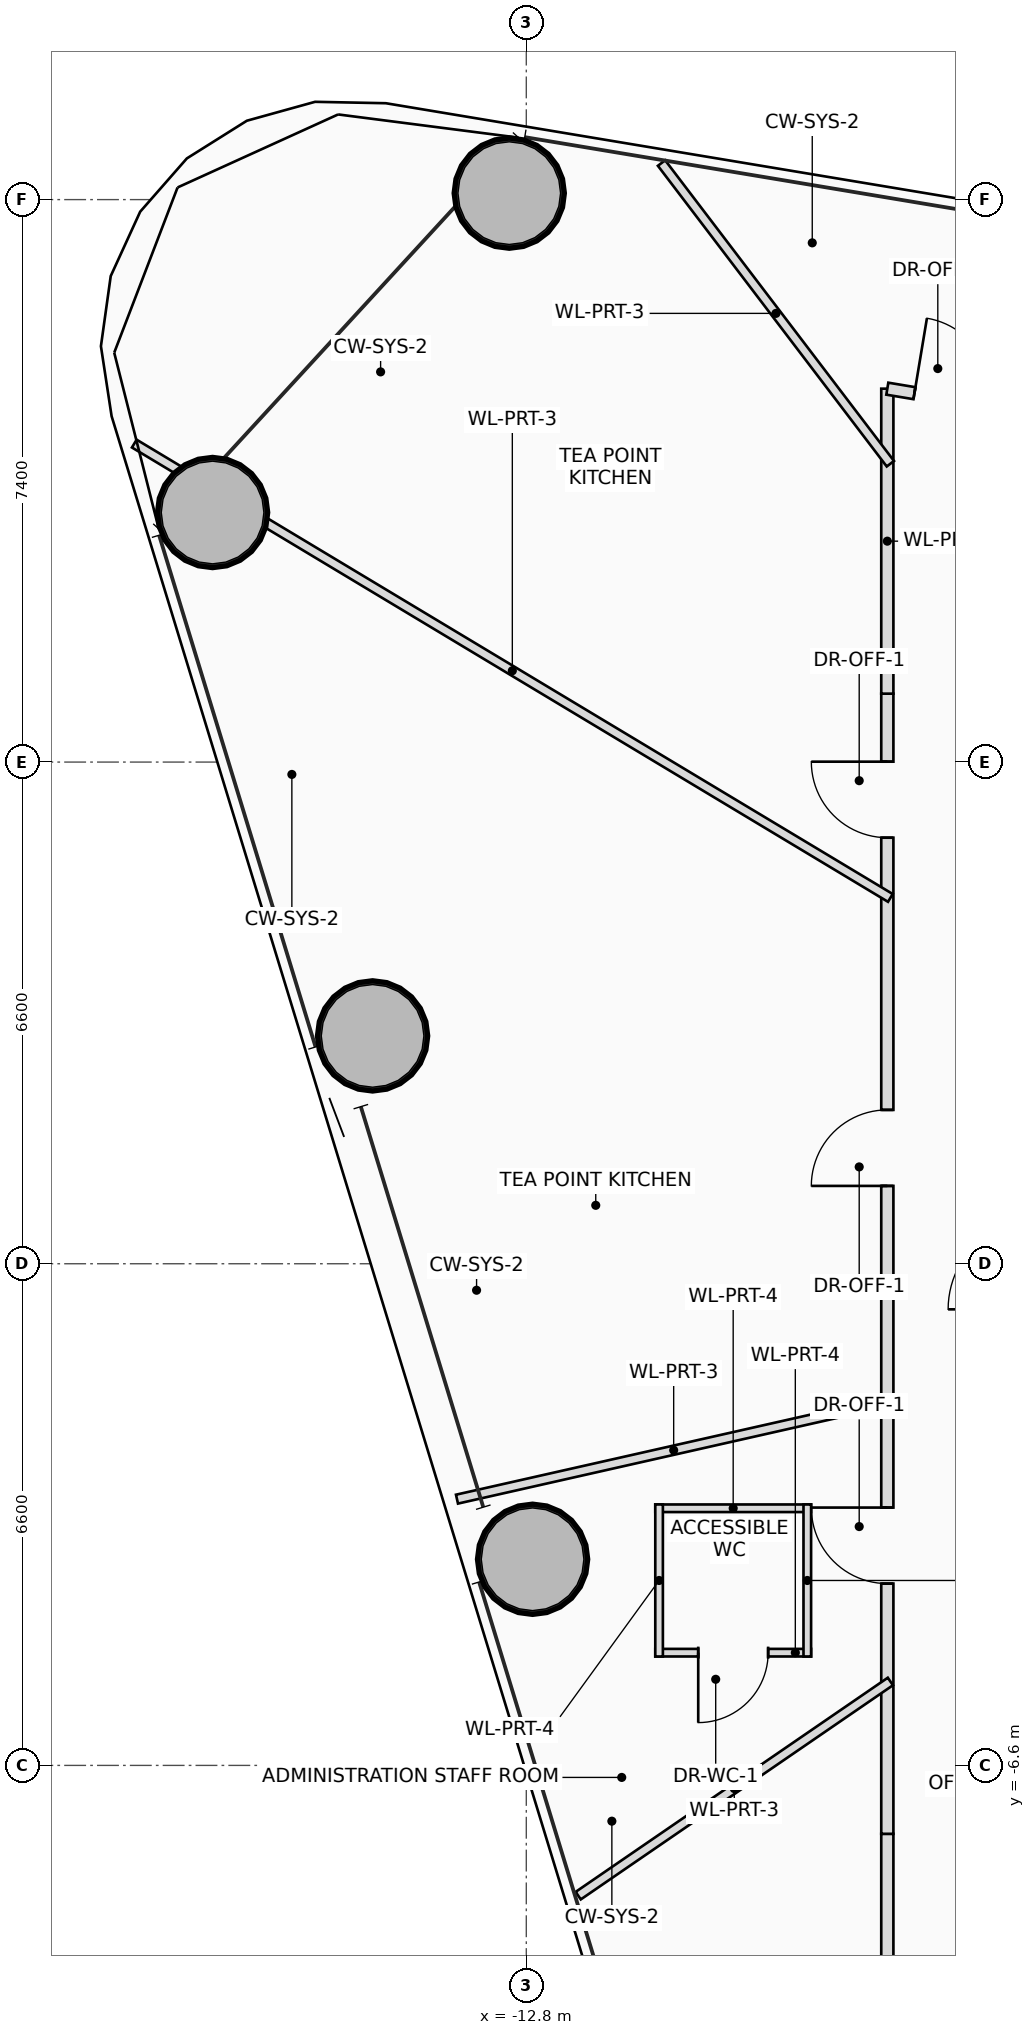
"""IFC4 building model, lengths in metres.
Left out: names, types, materials, properties, quantities, classifications, styles, units other than length and angle.
Written with IfcOpenShell. Run it as: python <this file> out.ifc"""

import sys

from ifc_helpers import new_model, si_unit, direction, frame, frame_2d, origin, origin_2d, place, context, subcontext, project, spatial, rectangle, hollow_circle, extrude, source, transform, mapped, element, fill, save


model = new_model("IFC4")
c1 = context("Model", 3, precision=1e-05, world=origin(), true_north=direction((0.0, 1.0)))
c2 = subcontext(c1, "Body", "Model", "MODEL_VIEW")
j1 = project(units=[si_unit("LENGTHUNIT", "METRE"), si_unit("PLANEANGLEUNIT", "RADIAN")], contexts=[c1])
p1 = place(None, origin())
s1 = spatial("IfcSite", under=j1, at=p1, CompositionType="ELEMENT")
p2 = place(p1, origin())
s2 = spatial("IfcBuilding", under=s1, at=p2, CompositionType="ELEMENT")
p3 = place(p2, frame((0.0, 0.0, 93.65)))
s3 = spatial("IfcBuildingStorey", under=s2, at=p3, CompositionType="ELEMENT", Elevation=93.65)
m1 = source(origin(), c2, "Body", "SweptSolid", [
    extrude(hollow_circle(Radius=0.725, WallThickness=0.05, at=origin_2d()), origin(), (0.0, 0.0, 1.0), 3.75),
])
for number, where, z_axis, x_axis in (
    (1, (-13.024, 14.085, 0.0), (0.0, 0.0, 1.0), (1.0, 0.0, 0.0)),
    (2, (-16.927, 9.883, 0.0), (0.0, 0.0, 1.0), (1.0, 0.0, 0.0)),
    (3, (-14.823, 2.998, 0.0), (0.0, 0.0, 1.0), (1.0, 0.0, 0.0)),
    (4, (-12.717, -3.888, 0.0), (0.0, 0.0, 1.0), (1.0, 0.0, 0.0)),
):
    element("IfcColumn", number, at=place(p3, frame(where, z_axis=z_axis, x_axis=x_axis)), inside=s3, PredefinedType="COLUMN", context=c2, shape_type="MappedRepresentation", body=[
        mapped(m1, transform((0.0, 0.0, 0.0), scale=1.0)),
    ])
p4 = place(p3, frame((-11.103, -3.217, 0.0), z_axis=(0.0, 0.0, 1.0), x_axis=(1.0, 0.0, 0.0)))
e5 = element("IfcWall", 5, at=p4, inside=s3, PredefinedType="PARTITIONING", context=c2, shape_type="SweptSolid", body=[
    extrude(rectangle(XDim=2.05, YDim=0.1, at=frame_2d((1.025, 0.0))), origin(), (0.0, 0.0, 1.0), 3.05),
])
p5 = place(p3, frame((-9.053, -5.117, 0.0), z_axis=(0.0, 0.0, 1.0), x_axis=(-1.0, 0.0, 0.0)))
e6 = element("IfcWall", 6, at=p5, inside=s3, PredefinedType="PARTITIONING", context=c2, shape_type="SweptSolid", body=[
    extrude(rectangle(XDim=2.05, YDim=0.1, at=frame_2d((1.025, 0.0))), origin(), (0.0, 0.0, 1.0), 3.05),
])
p6 = place(p5, frame((0.565, 0.0, 0.0)))
e7 = element("IfcOpeningElement", 7, at=p6, cuts=e6, PredefinedType="OPENING", context=c2, shape_type="SweptSolid", body=[
    extrude(rectangle(XDim=0.92, YDim=2.1, at=frame_2d((0.46, 1.05))), frame((0.0, 0.06, 0.0), z_axis=(0.0, -1.0, 0.0), x_axis=(1.0, 0.0, 0.0)), (0.0, 0.0, 1.0), 0.12),
])
for number, where, z_axis, x_axis in (
    (8, (-9.103, -3.167, 0.0), (0.0, 0.0, 1.0), (0.0, -1.0, 0.0)),
    (9, (-11.053, -5.167, 0.0), (0.0, 0.0, 1.0), (0.0, 1.0, 0.0)),
):
    element("IfcWall", number, at=place(p3, frame(where, z_axis=z_axis, x_axis=x_axis)), inside=s3, PredefinedType="PARTITIONING", context=c2, shape_type="SweptSolid", body=[
        extrude(rectangle(XDim=2.0, YDim=0.1, at=frame_2d((1.0, 0.0))), origin(), (0.0, 0.0, 1.0), 2.85),
    ])
p7 = place(p3, frame((-8.05, -13.271, 0.0), z_axis=(0.0, 0.0, 1.0), x_axis=(0.0, 1.0, 0.0)))
e10 = element("IfcWall", 10, at=p7, inside=s3, PredefinedType="PARTITIONING", context=c2, shape_type="SweptSolid", body=[
    extrude(rectangle(XDim=5.771, YDim=0.16, at=frame_2d((2.885, 0.0))), origin(), (0.0, 0.0, 1.0), 2.85),
])
p8 = place(p7, frame((2.385, 0.0, 0.0)))
e11 = element("IfcOpeningElement", 11, at=p8, cuts=e10, PredefinedType="OPENING", context=c2, shape_type="SweptSolid", body=[
    extrude(rectangle(XDim=1.0, YDim=2.25, at=frame_2d((0.5, 1.125))), frame((0.0, 0.09, 0.0), z_axis=(0.0, -1.0, 0.0), x_axis=(1.0, 0.0, 0.0)), (0.0, 0.0, 1.0), 0.18),
])
p9 = place(p3, frame((-8.05, -7.5, 0.0), z_axis=(0.0, 0.0, 1.0), x_axis=(0.0, 1.0, 0.0)))
e12 = element("IfcWall", 12, at=p9, inside=s3, PredefinedType="PARTITIONING", context=c2, shape_type="SweptSolid", body=[
    extrude(rectangle(XDim=15.0, YDim=0.16, at=frame_2d((7.5, 0.0))), origin(), (0.0, 0.0, 1.0), 2.85),
])
p10 = place(p9, frame((3.292, 0.0, 0.0)))
e13 = element("IfcOpeningElement", 13, at=p10, cuts=e12, PredefinedType="OPENING", context=c2, shape_type="SweptSolid", body=[
    extrude(rectangle(XDim=1.0, YDim=2.25, at=frame_2d((0.5, 1.125))), frame((0.0, 0.09, 0.0), z_axis=(0.0, -1.0, 0.0), x_axis=(1.0, 0.0, 0.0)), (0.0, 0.0, 1.0), 0.18),
])
p11 = place(p9, frame((8.524, 0.0, 0.0)))
e14 = element("IfcOpeningElement", 14, at=p11, cuts=e12, PredefinedType="OPENING", context=c2, shape_type="SweptSolid", body=[
    extrude(rectangle(XDim=1.0, YDim=2.25, at=frame_2d((0.5, 1.125))), frame((0.0, 0.09, 0.0), z_axis=(0.0, -1.0, 0.0), x_axis=(1.0, 0.0, 0.0)), (0.0, 0.0, 1.0), 0.18),
])
p12 = place(p9, frame((13.105, 0.0, 0.0)))
e15 = element("IfcOpeningElement", 15, at=p12, cuts=e12, PredefinedType="OPENING", context=c2, shape_type="SweptSolid", body=[
    extrude(rectangle(XDim=1.0, YDim=2.25, at=frame_2d((0.5, 1.125))), frame((0.0, 0.09, 0.0), z_axis=(0.0, -1.0, 0.0), x_axis=(1.0, 0.0, 0.0)), (0.0, 0.0, 1.0), 0.18),
])
p13 = place(p3, frame((-8.05, 7.5, 0.0), z_axis=(0.0, 0.0, 1.0), x_axis=(0.0, 1.0, 0.0)))
e16 = element("IfcWall", 16, at=p13, inside=s3, PredefinedType="PARTITIONING", context=c2, shape_type="SweptSolid", body=[
    extrude(rectangle(XDim=4.012, YDim=0.16, at=frame_2d((2.006, 0.0))), origin(), (0.0, 0.0, 1.0), 2.85),
])
p14 = place(p3, frame((-8.05, 11.512, 0.0), z_axis=(0.0, 0.0, 1.0), x_axis=(0.986405407683, -0.164330069354, 0.0)))
e17 = element("IfcWall", 17, at=p14, inside=s3, PredefinedType="PARTITIONING", context=c2, shape_type="SweptSolid", body=[
    extrude(rectangle(XDim=1.723, YDim=0.16, at=frame_2d((0.862, 0.0))), origin(), (0.0, 0.0, 1.0), 3.545),
])
p15 = place(p14, frame((0.362, 0.0, 0.0)))
e18 = element("IfcOpeningElement", 18, at=p15, cuts=e17, PredefinedType="OPENING", context=c2, shape_type="SweptSolid", body=[
    extrude(rectangle(XDim=1.0, YDim=2.25, at=frame_2d((0.5, 1.125))), frame((0.0, 0.09, 0.0), z_axis=(0.0, -1.0, 0.0), x_axis=(1.0, 0.0, 0.0)), (0.0, 0.0, 1.0), 0.18),
])
p16 = place(p3, frame((-8.01, 4.813, 0.0), z_axis=(0.0, 0.0, 1.0), x_axis=(-0.857173493242, 0.515027768653, 0.0)))
e19 = element("IfcWall", 19, at=p16, inside=s3, PredefinedType="PARTITIONING", context=c2, shape_type="SweptSolid", body=[
    extrude(rectangle(XDim=11.605, YDim=0.12, at=frame_2d((5.803, 0.0))), origin(), (0.0, 0.0, 1.0), 2.85),
])
p17 = place(p3, frame((-8.01, -1.809, 0.0), z_axis=(0.0, 0.0, 1.0), x_axis=(-0.975429422211, -0.220312147384, 0.0)))
e20 = element("IfcWall", 20, at=p17, inside=s3, PredefinedType="PARTITIONING", context=c2, shape_type="SweptSolid", body=[
    extrude(rectangle(XDim=5.845, YDim=0.12, at=frame_2d((2.923, 0.0))), origin(), (0.0, 0.0, 1.0), 3.01),
])
p18 = place(p3, frame((-8.01, -5.496, 0.0), z_axis=(0.0, 0.0, 1.0), x_axis=(-0.824586433319, -0.565735993186, 0.0)))
e21 = element("IfcWall", 21, at=p18, inside=s3, PredefinedType="PARTITIONING", context=c2, shape_type="SweptSolid", body=[
    extrude(rectangle(XDim=4.981, YDim=0.12, at=frame_2d((2.49, 0.0))), origin(), (0.0, 0.0, 1.0), 3.01),
])
p19 = place(p3, frame((-8.01, 10.525, 0.0), z_axis=(0.0, 0.0, 1.0), x_axis=(-0.605587414203, 0.79577879072, 0.0)))
e22 = element("IfcWall", 22, at=p19, inside=s3, PredefinedType="PARTITIONING", context=c2, shape_type="SweptSolid", body=[
    extrude(rectangle(XDim=4.972, YDim=0.12, at=frame_2d((2.486, 0.0))), origin(), (0.0, 0.0, 1.0), 3.01),
])
p20 = place(p6, origin())
e23 = element("IfcDoor", 23, at=p20, inside=s3, OperationType="SINGLE_SWING_RIGHT", PredefinedType="DOOR", context=c2, shape_type="SweptSolid", body=[
    extrude(rectangle(XDim=0.92, YDim=2.1, at=frame_2d((0.46, 1.05))), frame((0.0, 0.025, 0.0), z_axis=(0.0, -1.0, 0.0), x_axis=(1.0, 0.0, 0.0)), (0.0, 0.0, 1.0), 0.05),
])
fill(e7, e23)
p21 = place(p10, origin())
e24 = element("IfcDoor", 24, at=p21, inside=s3, OperationType="SINGLE_SWING_RIGHT", PredefinedType="DOOR", context=c2, shape_type="SweptSolid", body=[
    extrude(rectangle(XDim=1.0, YDim=2.25, at=frame_2d((0.5, 1.125))), frame((0.0, 0.025, 0.0), z_axis=(0.0, -1.0, 0.0), x_axis=(1.0, 0.0, 0.0)), (0.0, 0.0, 1.0), 0.05),
])
fill(e13, e24)
p22 = place(p11, origin())
e25 = element("IfcDoor", 25, at=p22, inside=s3, OperationType="SINGLE_SWING_LEFT", PredefinedType="DOOR", context=c2, shape_type="SweptSolid", body=[
    extrude(rectangle(XDim=1.0, YDim=2.25, at=frame_2d((0.5, 1.125))), frame((0.0, 0.025, 0.0), z_axis=(0.0, -1.0, 0.0), x_axis=(1.0, 0.0, 0.0)), (0.0, 0.0, 1.0), 0.05),
])
fill(e14, e25)
p23 = place(p12, origin())
e26 = element("IfcDoor", 26, at=p23, inside=s3, OperationType="SINGLE_SWING_RIGHT", PredefinedType="DOOR", context=c2, shape_type="SweptSolid", body=[
    extrude(rectangle(XDim=1.0, YDim=2.25, at=frame_2d((0.5, 1.125))), frame((0.0, 0.025, 0.0), z_axis=(0.0, -1.0, 0.0), x_axis=(1.0, 0.0, 0.0)), (0.0, 0.0, 1.0), 0.05),
])
fill(e15, e26)
p24 = place(p15, origin())
e27 = element("IfcDoor", 27, at=p24, inside=s3, OperationType="SINGLE_SWING_LEFT", PredefinedType="DOOR", context=c2, shape_type="SweptSolid", body=[
    extrude(rectangle(XDim=1.0, YDim=2.25, at=frame_2d((0.5, 1.125))), frame((0.0, 0.025, 0.0), z_axis=(0.0, -1.0, 0.0), x_axis=(1.0, 0.0, 0.0)), (0.0, 0.0, 1.0), 0.05),
])
fill(e18, e27)
save(model, sys.argv[1])
